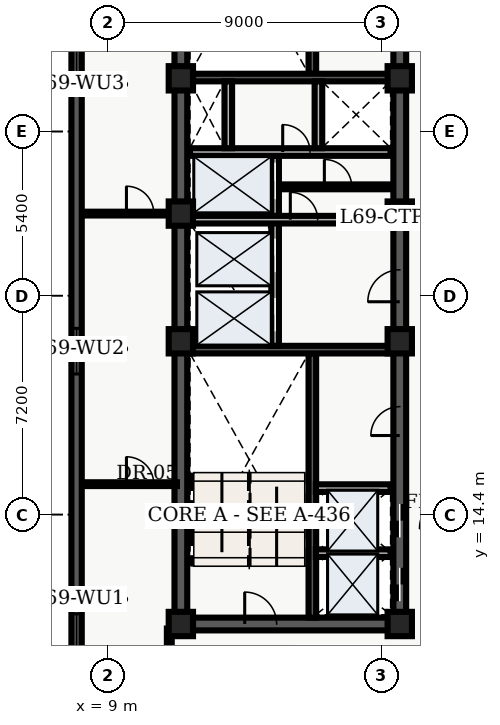
"""IFC4 building model, lengths in metres.
Left out: names, types, materials, properties, quantities, classifications, styles, units other than length and angle.
Written with IfcOpenShell. Run it as: python <this file> out.ifc"""

import sys

from ifc_helpers import new_model, entity, si_unit, converted_unit, direction, frame, origin_with_axes, origin_2d_with_axis, place, context, subcontext, project, spatial, polyline, rectangle, outline, extrude, element, fill, save


model = new_model("IFC4")
c1 = context("Model", 3, precision=1e-05, world=origin_with_axes(), true_north=direction((0.0, 1.0)))
c2 = subcontext(c1, "Body", "Model", "MODEL_VIEW")
j1 = project(units=[si_unit("LENGTHUNIT", "METRE"), converted_unit("PLANEANGLEUNIT", "DEGREE", entity("IfcPlaneAngleMeasure", 0.017), si_unit("PLANEANGLEUNIT", "RADIAN"), dimensions=[0, 0, 0, 0, 0, 0, 0])], contexts=[c1])
p1 = place(None, origin_with_axes())
s1 = spatial("IfcSite", under=j1, at=p1, CompositionType="ELEMENT")
p2 = place(p1, origin_with_axes())
s2 = spatial("IfcBuilding", under=s1, at=p2, CompositionType="ELEMENT")
p3 = place(p2, frame((0.0, 0.0, 280.2), z_axis=(0.0, 0.0, 1.0), x_axis=(1.0, 0.0, 0.0)))
s3 = spatial("IfcBuildingStorey", under=s2, at=p3, CompositionType="ELEMENT", Elevation=280.2)
p4 = place(p3, frame((11.4, 10.8, 0.0), z_axis=(0.0, 0.0, 1.0), x_axis=(0.0, 1.0, 0.0)))
e1 = element("IfcWall", 1, at=p4, inside=s3, PredefinedType="SHEAR", context=c2, shape_type="SweptSolid", body=[
    extrude(outline(polyline([(0.0, -0.21), (27.0, -0.21), (27.0, 0.21), (0.0, 0.21), (0.0, -0.21)])), origin_with_axes(), (0.0, 0.0, 1.0), 3.66),
])
p5 = place(p3, frame((11.4, 10.8, 0.0), z_axis=(0.0, 0.0, 1.0), x_axis=(1.0, 0.0, 0.0)))
e2 = element("IfcWall", 2, at=p5, inside=s3, PredefinedType="SHEAR", context=c2, shape_type="SweptSolid", body=[
    extrude(outline(polyline([(0.0, -0.21), (7.2, -0.21), (7.2, 0.21), (0.0, 0.21), (0.0, -0.21)])), origin_with_axes(), (0.0, 0.0, 1.0), 3.66),
])
p6 = place(p5, frame((2.625, 0.0, 0.0), z_axis=(0.0, 0.0, 1.0), x_axis=(1.0, 0.0, 0.0)))
e3 = element("IfcOpeningElement", 3, at=p6, cuts=e2, PredefinedType="OPENING", context=c2, shape_type="SweptSolid", body=[
    extrude(rectangle(XDim=1.05, YDim=0.44, at=origin_2d_with_axis()), origin_with_axes(), (0.0, 0.0, 1.0), 2.15),
])
p7 = place(p3, frame((18.6, 10.8, 0.0), z_axis=(0.0, 0.0, 1.0), x_axis=(0.0, 1.0, 0.0)))
e4 = element("IfcWall", 4, at=p7, inside=s3, PredefinedType="SHEAR", context=c2, shape_type="SweptSolid", body=[
    extrude(outline(polyline([(0.0, -0.21), (13.5, -0.21), (13.5, 0.21), (0.0, 0.21), (0.0, -0.21)])), origin_with_axes(), (0.0, 0.0, 1.0), 3.66),
])
p8 = place(p7, frame((1.3, 0.0, 0.0), z_axis=(0.0, 0.0, 1.0), x_axis=(1.0, 0.0, 0.0)))
e5 = element("IfcOpeningElement", 5, at=p8, cuts=e4, PredefinedType="OPENING", context=c2, shape_type="SweptSolid", body=[
    extrude(rectangle(XDim=1.1, YDim=0.44, at=origin_2d_with_axis()), origin_with_axes(), (0.0, 0.0, 1.0), 2.15),
])
p9 = place(p7, frame((3.4, 0.0, 0.0), z_axis=(0.0, 0.0, 1.0), x_axis=(1.0, 0.0, 0.0)))
e6 = element("IfcOpeningElement", 6, at=p9, cuts=e4, PredefinedType="OPENING", context=c2, shape_type="SweptSolid", body=[
    extrude(rectangle(XDim=1.1, YDim=0.44, at=origin_2d_with_axis()), origin_with_axes(), (0.0, 0.0, 1.0), 2.15),
])
p10 = place(p7, frame((11.125, 0.0, 0.0), z_axis=(0.0, 0.0, 1.0), x_axis=(1.0, 0.0, 0.0)))
e7 = element("IfcOpeningElement", 7, at=p10, cuts=e4, PredefinedType="OPENING", context=c2, shape_type="SweptSolid", body=[
    extrude(rectangle(XDim=1.05, YDim=0.44, at=origin_2d_with_axis()), origin_with_axes(), (0.0, 0.0, 1.0), 2.15),
])
p11 = place(p7, frame((6.675, 0.0, 0.0), z_axis=(0.0, 0.0, 1.0), x_axis=(1.0, 0.0, 0.0)))
e8 = element("IfcOpeningElement", 8, at=p11, cuts=e4, PredefinedType="OPENING", context=c2, shape_type="SweptSolid", body=[
    extrude(rectangle(XDim=0.95, YDim=0.44, at=origin_2d_with_axis()), origin_with_axes(), (0.0, 0.0, 1.0), 2.15),
])
p12 = place(p3, frame((18.6, 24.3, 0.0), z_axis=(0.0, 0.0, 1.0), x_axis=(0.0, 1.0, 0.0)))
e9 = element("IfcWall", 9, at=p12, inside=s3, PredefinedType="SHEAR", context=c2, shape_type="SweptSolid", body=[
    extrude(outline(polyline([(0.0, -0.21), (13.5, -0.21), (13.5, 0.21), (0.0, 0.21), (0.0, -0.21)])), origin_with_axes(), (0.0, 0.0, 1.0), 3.66),
])
p13 = place(p12, frame((6.275, 0.0, 0.0), z_axis=(0.0, 0.0, 1.0), x_axis=(1.0, 0.0, 0.0)))
e10 = element("IfcOpeningElement", 10, at=p13, cuts=e9, PredefinedType="OPENING", context=c2, shape_type="SweptSolid", body=[
    extrude(rectangle(XDim=0.95, YDim=0.44, at=origin_2d_with_axis()), origin_with_axes(), (0.0, 0.0, 1.0), 2.15),
])
p14 = place(p12, frame((10.875, 0.0, 0.0), z_axis=(0.0, 0.0, 1.0), x_axis=(1.0, 0.0, 0.0)))
e11 = element("IfcOpeningElement", 11, at=p14, cuts=e9, PredefinedType="OPENING", context=c2, shape_type="SweptSolid", body=[
    extrude(rectangle(XDim=0.95, YDim=0.44, at=origin_2d_with_axis()), origin_with_axes(), (0.0, 0.0, 1.0), 2.15),
])
p15 = place(p3, frame((15.725, 11.01, 0.0), z_axis=(0.0, 0.0, 1.0), x_axis=(0.0, 1.0, 0.0)))
e12 = element("IfcWall", 12, at=p15, inside=s3, PredefinedType="SHEAR", context=c2, shape_type="SweptSolid", body=[
    extrude(outline(polyline([(0.0, -0.125), (8.69, -0.125), (8.69, 0.125), (0.0, 0.125), (0.0, -0.125)])), origin_with_axes(), (0.0, 0.0, 1.0), 3.66),
])
p16 = place(p3, frame((11.61, 19.825, 0.0), z_axis=(0.0, 0.0, 1.0), x_axis=(1.0, 0.0, 0.0)))
e13 = element("IfcWall", 13, at=p16, inside=s3, PredefinedType="SHEAR", context=c2, shape_type="SweptSolid", body=[
    extrude(outline(polyline([(0.0, -0.125), (6.78, -0.125), (6.78, 0.125), (0.0, 0.125), (0.0, -0.125)])), origin_with_axes(), (0.0, 0.0, 1.0), 3.66),
])
p17 = place(p3, frame((15.725, 28.9, 0.0), z_axis=(0.0, 0.0, 1.0), x_axis=(0.0, 1.0, 0.0)))
e14 = element("IfcWall", 14, at=p17, inside=s3, PredefinedType="SHEAR", context=c2, shape_type="SweptSolid", body=[
    extrude(outline(polyline([(0.0, -0.125), (8.69, -0.125), (8.69, 0.125), (0.0, 0.125), (0.0, -0.125)])), origin_with_axes(), (0.0, 0.0, 1.0), 3.66),
])
p18 = place(p3, frame((11.61, 28.775, 0.0), z_axis=(0.0, 0.0, 1.0), x_axis=(1.0, 0.0, 0.0)))
e15 = element("IfcWall", 15, at=p18, inside=s3, PredefinedType="SHEAR", context=c2, shape_type="SweptSolid", body=[
    extrude(outline(polyline([(0.0, -0.125), (6.78, -0.125), (6.78, 0.125), (0.0, 0.125), (0.0, -0.125)])), origin_with_axes(), (0.0, 0.0, 1.0), 3.66),
])
p19 = place(p3, frame((14.5, 19.95, 0.0), z_axis=(0.0, 0.0, 1.0), x_axis=(0.0, 1.0, 0.0)))
e16 = element("IfcWall", 16, at=p19, inside=s3, PredefinedType="SOLIDWALL", context=c2, shape_type="SweptSolid", body=[
    extrude(outline(polyline([(0.0, -0.125), (6.25, -0.125), (6.25, 0.125), (0.0, 0.125), (0.0, -0.125)])), origin_with_axes(), (0.0, 0.0, 1.0), 2.7),
])
p20 = place(p19, frame((1.025, 0.0, 0.0), z_axis=(0.0, 0.0, 1.0), x_axis=(1.0, 0.0, 0.0)))
e17 = element("IfcOpeningElement", 17, at=p20, cuts=e16, PredefinedType="OPENING", context=c2, shape_type="SweptSolid", body=[
    extrude(rectangle(XDim=1.1, YDim=0.27, at=origin_2d_with_axis()), origin_with_axes(), (0.0, 0.0, 1.0), 2.15),
])
p21 = place(p19, frame((2.975, 0.0, 0.0), z_axis=(0.0, 0.0, 1.0), x_axis=(1.0, 0.0, 0.0)))
e18 = element("IfcOpeningElement", 18, at=p21, cuts=e16, PredefinedType="OPENING", context=c2, shape_type="SweptSolid", body=[
    extrude(rectangle(XDim=1.1, YDim=0.27, at=origin_2d_with_axis()), origin_with_axes(), (0.0, 0.0, 1.0), 2.15),
])
p22 = place(p19, frame((5.425, 0.0, 0.0), z_axis=(0.0, 0.0, 1.0), x_axis=(1.0, 0.0, 0.0)))
e19 = element("IfcOpeningElement", 19, at=p22, cuts=e16, PredefinedType="OPENING", context=c2, shape_type="SweptSolid", body=[
    extrude(rectangle(XDim=1.2, YDim=0.27, at=origin_2d_with_axis()), origin_with_axes(), (0.0, 0.0, 1.0), 2.15),
])
p23 = place(p3, frame((11.7, 24.1, 0.0), z_axis=(0.0, 0.0, 1.0), x_axis=(1.0, 0.0, 0.0)))
e20 = element("IfcWall", 20, at=p23, inside=s3, PredefinedType="SOLIDWALL", context=c2, shape_type="SweptSolid", body=[
    extrude(outline(polyline([(0.0, -0.125), (6.6, -0.125), (6.6, 0.125), (0.0, 0.125), (0.0, -0.125)])), origin_with_axes(), (0.0, 0.0, 1.0), 2.7),
])
p24 = place(p23, frame((3.75, 0.0, 0.0), z_axis=(0.0, 0.0, 1.0), x_axis=(1.0, 0.0, 0.0)))
e21 = element("IfcOpeningElement", 21, at=p24, cuts=e20, PredefinedType="OPENING", context=c2, shape_type="SweptSolid", body=[
    extrude(rectangle(XDim=0.9, YDim=0.27, at=origin_2d_with_axis()), origin_with_axes(), (0.0, 0.0, 1.0), 2.15),
])
p25 = place(p3, frame((11.7, 26.325, 0.0), z_axis=(0.0, 0.0, 1.0), x_axis=(1.0, 0.0, 0.0)))
e22 = element("IfcWall", 22, at=p25, inside=s3, PredefinedType="SOLIDWALL", context=c2, shape_type="SweptSolid", body=[
    extrude(outline(polyline([(0.0, -0.125), (6.6, -0.125), (6.6, 0.125), (0.0, 0.125), (0.0, -0.125)])), origin_with_axes(), (0.0, 0.0, 1.0), 2.7),
])
p26 = place(p25, frame((3.5, 0.0, 0.0), z_axis=(0.0, 0.0, 1.0), x_axis=(1.0, 0.0, 0.0)))
e23 = element("IfcOpeningElement", 23, at=p26, cuts=e22, PredefinedType="OPENING", context=c2, shape_type="SweptSolid", body=[
    extrude(rectangle(XDim=0.9, YDim=0.27, at=origin_2d_with_axis()), origin_with_axes(), (0.0, 0.0, 1.0), 2.15),
])
for number, where, z_axis, x_axis in (
    (24, (12.96, 26.45, 0.0), (0.0, 0.0, 1.0), (0.0, 1.0, 0.0)),
    (25, (15.925, 26.45, 0.0), (0.0, 0.0, 1.0), (0.0, 1.0, 0.0)),
):
    element("IfcWall", number, at=place(p3, frame(where, z_axis=z_axis, x_axis=x_axis)), inside=s3, PredefinedType="SOLIDWALL", context=c2, shape_type="SweptSolid", body=[
        extrude(outline(polyline([(0.0, -0.125), (2.2, -0.125), (2.2, 0.125), (0.0, 0.125), (0.0, -0.125)])), origin_with_axes(), (0.0, 0.0, 1.0), 2.7),
    ])
for number, where, z_axis, x_axis in (
    (26, (11.4, 10.8, 0.0), (0.0, 0.0, 1.0), (1.0, 0.0, 0.0)),
    (27, (11.4, 20.1, 0.0), (0.0, 0.0, 1.0), (1.0, 0.0, 0.0)),
    (28, (11.4, 24.3, 0.0), (0.0, 0.0, 1.0), (1.0, 0.0, 0.0)),
    (29, (11.4, 28.75, 0.0), (0.0, 0.0, 1.0), (1.0, 0.0, 0.0)),
    (30, (18.6, 10.8, 0.0), (0.0, 0.0, 1.0), (1.0, 0.0, 0.0)),
    (31, (18.6, 20.1, 0.0), (0.0, 0.0, 1.0), (1.0, 0.0, 0.0)),
    (32, (18.6, 24.3, 0.0), (0.0, 0.0, 1.0), (1.0, 0.0, 0.0)),
    (33, (18.6, 28.75, 0.0), (0.0, 0.0, 1.0), (1.0, 0.0, 0.0)),
):
    element("IfcColumn", number, at=place(p3, frame(where, z_axis=z_axis, x_axis=x_axis)), inside=s3, PredefinedType="COLUMN", context=c2, shape_type="SweptSolid", body=[
        extrude(rectangle(XDim=0.8, YDim=0.8, at=origin_2d_with_axis()), origin_with_axes(), (0.0, 0.0, 1.0), 3.9),
    ])
p27 = place(p3, frame((14.62, 25.18, 0.0), z_axis=(0.0, 0.0, 1.0), x_axis=(1.0, 0.0, 0.0)))
e34 = element("IfcWall", 34, at=p27, inside=s3, PredefinedType="PARTITIONING", context=c2, shape_type="SweptSolid", body=[
    extrude(outline(polyline([(0.0, -0.08), (3.68, -0.08), (3.68, 0.08), (0.0, 0.08), (0.0, -0.08)])), origin_with_axes(), (0.0, 0.0, 1.0), 2.7),
])
p28 = place(p27, frame((1.95, 0.0, 0.0), z_axis=(0.0, 0.0, 1.0), x_axis=(1.0, 0.0, 0.0)))
e35 = element("IfcOpeningElement", 35, at=p28, cuts=e34, PredefinedType="OPENING", context=c2, shape_type="SweptSolid", body=[
    extrude(rectangle(XDim=0.9, YDim=0.18, at=origin_2d_with_axis()), origin_with_axes(), (0.0, 0.0, 1.0), 2.15),
])
for number, where, z_axis, x_axis in (
    (36, (15.84, 13.13, 0.0), (0.0, 0.0, 1.0), (1.0, 0.0, 0.0)),
    (37, (15.84, 15.27, 0.0), (0.0, 0.0, 1.0), (1.0, 0.0, 0.0)),
):
    element("IfcWall", number, at=place(p3, frame(where, z_axis=z_axis, x_axis=x_axis)), inside=s3, PredefinedType="SOLIDWALL", context=c2, shape_type="SweptSolid", body=[
        extrude(outline(polyline([(0.0, -0.125), (2.46, -0.125), (2.46, 0.125), (0.0, 0.125), (0.0, -0.125)])), origin_with_axes(), (0.0, 0.0, 1.0), 2.7),
    ])
p29 = place(p3, frame((11.02, 7.8, 0.0), z_axis=(0.0, 0.0, 1.0), x_axis=(0.0, 1.0, 0.0)))
e38 = element("IfcWall", 38, at=p29, inside=s3, PredefinedType="PARTITIONING", context=c2, shape_type="SweptSolid", body=[
    extrude(outline(polyline([(0.0, -0.08), (2.85, -0.08), (2.85, 0.08), (0.0, 0.08), (0.0, -0.08)])), origin_with_axes(), (0.0, 0.0, 1.0), 2.7),
])
p30 = place(p29, frame((1.0, 0.0, 0.0), z_axis=(0.0, 0.0, 1.0), x_axis=(1.0, 0.0, 0.0)))
e39 = element("IfcOpeningElement", 39, at=p30, cuts=e38, PredefinedType="OPENING", context=c2, shape_type="SweptSolid", body=[
    extrude(rectangle(XDim=0.9, YDim=0.18, at=origin_2d_with_axis()), origin_with_axes(), (0.0, 0.0, 1.0), 2.15),
])
p31 = place(p3, frame((8.135, 15.4, 0.0), z_axis=(0.0, 0.0, 1.0), x_axis=(1.0, 0.0, 0.0)))
e40 = element("IfcWall", 40, at=p31, inside=s3, PredefinedType="PARTITIONING", context=c2, shape_type="SweptSolid", body=[
    extrude(outline(polyline([(0.0, -0.062), (3.135, -0.062), (3.135, 0.062), (0.0, 0.062), (0.0, -0.062)])), origin_with_axes(), (0.0, 0.0, 1.0), 2.7),
])
p32 = place(p31, frame((1.925, 0.0, 0.0), z_axis=(0.0, 0.0, 1.0), x_axis=(1.0, 0.0, 0.0)))
e41 = element("IfcOpeningElement", 41, at=p32, cuts=e40, PredefinedType="OPENING", context=c2, shape_type="SweptSolid", body=[
    extrude(rectangle(XDim=0.9, YDim=0.145, at=origin_2d_with_axis()), origin_with_axes(), (0.0, 0.0, 1.0), 2.15),
])
p33 = place(p3, frame((8.135, 24.3, 0.0), z_axis=(0.0, 0.0, 1.0), x_axis=(1.0, 0.0, 0.0)))
e42 = element("IfcWall", 42, at=p33, inside=s3, PredefinedType="PARTITIONING", context=c2, shape_type="SweptSolid", body=[
    extrude(outline(polyline([(0.0, -0.062), (3.135, -0.062), (3.135, 0.062), (0.0, 0.062), (0.0, -0.062)])), origin_with_axes(), (0.0, 0.0, 1.0), 2.7),
])
p34 = place(p33, frame((1.925, 0.0, 0.0), z_axis=(0.0, 0.0, 1.0), x_axis=(1.0, 0.0, 0.0)))
e43 = element("IfcOpeningElement", 43, at=p34, cuts=e42, PredefinedType="OPENING", context=c2, shape_type="SweptSolid", body=[
    extrude(rectangle(XDim=0.9, YDim=0.145, at=origin_2d_with_axis()), origin_with_axes(), (0.0, 0.0, 1.0), 2.15),
])
p35 = place(p3, frame((7.97, 2.74, 0.0), z_axis=(0.0, 0.0, 1.0), x_axis=(0.0, 1.0, 0.0)))
e44 = element("IfcWall", 44, at=p35, inside=s3, PredefinedType="SOLIDWALL", context=c2, shape_type="SweptSolid", body=[
    extrude(outline(polyline([(0.0, -0.17), (43.46, -0.17), (43.46, 0.17), (0.0, 0.17), (0.0, -0.17)])), origin_with_axes(), (0.0, 0.0, 1.0), 3.66),
])
p36 = place(p35, frame((2.948, 0.0, 0.45), z_axis=(0.0, 0.0, 1.0), x_axis=(1.0, 0.0, 0.0)))
e45 = element("IfcOpeningElement", 45, at=p36, cuts=e44, PredefinedType="OPENING", context=c2, shape_type="SweptSolid", body=[
    extrude(rectangle(XDim=1.5, YDim=0.36, at=origin_2d_with_axis()), origin_with_axes(), (0.0, 0.0, 1.0), 2.1),
])
p37 = place(p35, frame((7.643, 0.0, 0.45), z_axis=(0.0, 0.0, 1.0), x_axis=(1.0, 0.0, 0.0)))
e46 = element("IfcOpeningElement", 46, at=p37, cuts=e44, PredefinedType="OPENING", context=c2, shape_type="SweptSolid", body=[
    extrude(rectangle(XDim=1.5, YDim=0.36, at=origin_2d_with_axis()), origin_with_axes(), (0.0, 0.0, 1.0), 2.1),
])
p38 = place(p35, frame((17.034, 0.0, 0.45), z_axis=(0.0, 0.0, 1.0), x_axis=(1.0, 0.0, 0.0)))
e47 = element("IfcOpeningElement", 47, at=p38, cuts=e44, PredefinedType="OPENING", context=c2, shape_type="SweptSolid", body=[
    extrude(rectangle(XDim=1.5, YDim=0.36, at=origin_2d_with_axis()), origin_with_axes(), (0.0, 0.0, 1.0), 2.1),
])
p39 = place(p35, frame((26.426, 0.0, 0.45), z_axis=(0.0, 0.0, 1.0), x_axis=(1.0, 0.0, 0.0)))
e48 = element("IfcOpeningElement", 48, at=p39, cuts=e44, PredefinedType="OPENING", context=c2, shape_type="SweptSolid", body=[
    extrude(rectangle(XDim=1.5, YDim=0.36, at=origin_2d_with_axis()), origin_with_axes(), (0.0, 0.0, 1.0), 2.1),
])
p40 = place(p35, frame((31.571, 0.0, 0.45), z_axis=(0.0, 0.0, 1.0), x_axis=(1.0, 0.0, 0.0)))
e49 = element("IfcOpeningElement", 49, at=p40, cuts=e44, PredefinedType="OPENING", context=c2, shape_type="SweptSolid", body=[
    extrude(rectangle(XDim=1.5, YDim=0.36, at=origin_2d_with_axis()), origin_with_axes(), (0.0, 0.0, 1.0), 2.1),
])
p41 = place(p35, frame((35.817, 0.0, 0.45), z_axis=(0.0, 0.0, 1.0), x_axis=(1.0, 0.0, 0.0)))
e50 = element("IfcOpeningElement", 50, at=p41, cuts=e44, PredefinedType="OPENING", context=c2, shape_type="SweptSolid", body=[
    extrude(rectangle(XDim=1.5, YDim=0.36, at=origin_2d_with_axis()), origin_with_axes(), (0.0, 0.0, 1.0), 2.1),
])
p42 = place(p35, frame((40.512, 0.0, 0.45), z_axis=(0.0, 0.0, 1.0), x_axis=(1.0, 0.0, 0.0)))
e51 = element("IfcOpeningElement", 51, at=p42, cuts=e44, PredefinedType="OPENING", context=c2, shape_type="SweptSolid", body=[
    extrude(rectangle(XDim=1.5, YDim=0.36, at=origin_2d_with_axis()), origin_with_axes(), (0.0, 0.0, 1.0), 2.1),
])
p43 = place(p7, frame((1.3, 0.0, 0.0), z_axis=(0.0, 0.0, 1.0), x_axis=(1.0, 0.0, 0.0)))
e52 = element("IfcDoor", 52, at=p43, inside=s3, OperationType="SLIDING_TO_LEFT", PredefinedType="DOOR", context=c2, shape_type="SweptSolid", body=[
    extrude(rectangle(XDim=1.1, YDim=0.09, at=origin_2d_with_axis()), origin_with_axes(), (0.0, 0.0, 1.0), 2.15),
])
fill(e5, e52)
p44 = place(p7, frame((3.4, 0.0, 0.0), z_axis=(0.0, 0.0, 1.0), x_axis=(1.0, 0.0, 0.0)))
e53 = element("IfcDoor", 53, at=p44, inside=s3, OperationType="SLIDING_TO_RIGHT", PredefinedType="DOOR", context=c2, shape_type="SweptSolid", body=[
    extrude(rectangle(XDim=1.1, YDim=0.09, at=origin_2d_with_axis()), origin_with_axes(), (0.0, 0.0, 1.0), 2.15),
])
fill(e6, e53)
p45 = place(p19, frame((1.025, 0.0, 0.0), z_axis=(0.0, 0.0, 1.0), x_axis=(1.0, 0.0, 0.0)))
e54 = element("IfcDoor", 54, at=p45, inside=s3, OperationType="SLIDING_TO_LEFT", PredefinedType="DOOR", context=c2, shape_type="SweptSolid", body=[
    extrude(rectangle(XDim=1.1, YDim=0.09, at=origin_2d_with_axis()), origin_with_axes(), (0.0, 0.0, 1.0), 2.15),
])
fill(e17, e54)
p46 = place(p19, frame((2.975, 0.0, 0.0), z_axis=(0.0, 0.0, 1.0), x_axis=(1.0, 0.0, 0.0)))
e55 = element("IfcDoor", 55, at=p46, inside=s3, OperationType="SLIDING_TO_RIGHT", PredefinedType="DOOR", context=c2, shape_type="SweptSolid", body=[
    extrude(rectangle(XDim=1.1, YDim=0.09, at=origin_2d_with_axis()), origin_with_axes(), (0.0, 0.0, 1.0), 2.15),
])
fill(e18, e55)
p47 = place(p19, frame((5.425, 0.0, 0.0), z_axis=(0.0, 0.0, 1.0), x_axis=(1.0, 0.0, 0.0)))
e56 = element("IfcDoor", 56, at=p47, inside=s3, OperationType="DOUBLE_DOOR_SLIDING", PredefinedType="DOOR", context=c2, shape_type="SweptSolid", body=[
    extrude(rectangle(XDim=1.2, YDim=0.09, at=origin_2d_with_axis()), origin_with_axes(), (0.0, 0.0, 1.0), 2.15),
])
fill(e19, e56)
p48 = place(p5, frame((2.625, 0.0, 0.0), z_axis=(0.0, 0.0, 1.0), x_axis=(1.0, 0.0, 0.0)))
e57 = element("IfcDoor", 57, at=p48, inside=s3, OperationType="SINGLE_SWING_LEFT", PredefinedType="DOOR", context=c2, shape_type="SweptSolid", body=[
    extrude(rectangle(XDim=1.05, YDim=0.09, at=origin_2d_with_axis()), origin_with_axes(), (0.0, 0.0, 1.0), 2.15),
])
fill(e3, e57)
p49 = place(p7, frame((11.125, 0.0, 0.0), z_axis=(0.0, 0.0, 1.0), x_axis=(1.0, 0.0, 0.0)))
e58 = element("IfcDoor", 58, at=p49, inside=s3, OperationType="SINGLE_SWING_LEFT", PredefinedType="DOOR", context=c2, shape_type="SweptSolid", body=[
    extrude(rectangle(XDim=1.05, YDim=0.09, at=origin_2d_with_axis()), origin_with_axes(), (0.0, 0.0, 1.0), 2.15),
])
fill(e7, e58)
p50 = place(p25, frame((3.5, 0.0, 0.0), z_axis=(0.0, 0.0, 1.0), x_axis=(1.0, 0.0, 0.0)))
e59 = element("IfcDoor", 59, at=p50, inside=s3, OperationType="SINGLE_SWING_LEFT", PredefinedType="DOOR", context=c2, shape_type="SweptSolid", body=[
    extrude(rectangle(XDim=0.9, YDim=0.09, at=origin_2d_with_axis()), origin_with_axes(), (0.0, 0.0, 1.0), 2.15),
])
fill(e23, e59)
p51 = place(p23, frame((3.75, 0.0, 0.0), z_axis=(0.0, 0.0, 1.0), x_axis=(1.0, 0.0, 0.0)))
e60 = element("IfcDoor", 60, at=p51, inside=s3, OperationType="SINGLE_SWING_LEFT", PredefinedType="DOOR", context=c2, shape_type="SweptSolid", body=[
    extrude(rectangle(XDim=0.9, YDim=0.09, at=origin_2d_with_axis()), origin_with_axes(), (0.0, 0.0, 1.0), 2.15),
])
fill(e21, e60)
p52 = place(p27, frame((1.95, 0.0, 0.0), z_axis=(0.0, 0.0, 1.0), x_axis=(1.0, 0.0, 0.0)))
e61 = element("IfcDoor", 61, at=p52, inside=s3, OperationType="SINGLE_SWING_LEFT", PredefinedType="DOOR", context=c2, shape_type="SweptSolid", body=[
    extrude(rectangle(XDim=0.9, YDim=0.09, at=origin_2d_with_axis()), origin_with_axes(), (0.0, 0.0, 1.0), 2.15),
])
fill(e35, e61)
p53 = place(p7, frame((6.675, 0.0, 0.0), z_axis=(0.0, 0.0, 1.0), x_axis=(1.0, 0.0, 0.0)))
e62 = element("IfcDoor", 62, at=p53, inside=s3, OperationType="SINGLE_SWING_LEFT", PredefinedType="DOOR", context=c2, shape_type="SweptSolid", body=[
    extrude(rectangle(XDim=0.95, YDim=0.09, at=origin_2d_with_axis()), origin_with_axes(), (0.0, 0.0, 1.0), 2.15),
])
fill(e8, e62)
p54 = place(p31, frame((1.925, 0.0, 0.0), z_axis=(0.0, 0.0, 1.0), x_axis=(1.0, 0.0, 0.0)))
e63 = element("IfcDoor", 63, at=p54, inside=s3, OperationType="SINGLE_SWING_LEFT", PredefinedType="DOOR", context=c2, shape_type="SweptSolid", body=[
    extrude(rectangle(XDim=0.9, YDim=0.075, at=origin_2d_with_axis()), origin_with_axes(), (0.0, 0.0, 1.0), 2.15),
])
fill(e41, e63)
p55 = place(p33, frame((1.925, 0.0, 0.0), z_axis=(0.0, 0.0, 1.0), x_axis=(1.0, 0.0, 0.0)))
e64 = element("IfcDoor", 64, at=p55, inside=s3, OperationType="SINGLE_SWING_LEFT", PredefinedType="DOOR", context=c2, shape_type="SweptSolid", body=[
    extrude(rectangle(XDim=0.9, YDim=0.075, at=origin_2d_with_axis()), origin_with_axes(), (0.0, 0.0, 1.0), 2.15),
])
fill(e43, e64)
p56 = place(p35, frame((7.643, 0.0, 0.45), z_axis=(0.0, 0.0, 1.0), x_axis=(1.0, 0.0, 0.0)))
e65 = element("IfcWindow", 65, at=p56, inside=s3, PredefinedType="WINDOW", context=c2, shape_type="SweptSolid", body=[
    extrude(rectangle(XDim=1.5, YDim=0.09, at=origin_2d_with_axis()), origin_with_axes(), (0.0, 0.0, 1.0), 2.1),
])
fill(e46, e65)
p57 = place(p35, frame((17.034, 0.0, 0.45), z_axis=(0.0, 0.0, 1.0), x_axis=(1.0, 0.0, 0.0)))
e66 = element("IfcWindow", 66, at=p57, inside=s3, PredefinedType="WINDOW", context=c2, shape_type="SweptSolid", body=[
    extrude(rectangle(XDim=1.5, YDim=0.09, at=origin_2d_with_axis()), origin_with_axes(), (0.0, 0.0, 1.0), 2.1),
])
fill(e47, e66)
p58 = place(p35, frame((26.426, 0.0, 0.45), z_axis=(0.0, 0.0, 1.0), x_axis=(1.0, 0.0, 0.0)))
e67 = element("IfcWindow", 67, at=p58, inside=s3, PredefinedType="WINDOW", context=c2, shape_type="SweptSolid", body=[
    extrude(rectangle(XDim=1.5, YDim=0.09, at=origin_2d_with_axis()), origin_with_axes(), (0.0, 0.0, 1.0), 2.1),
])
fill(e48, e67)
save(model, sys.argv[1])
